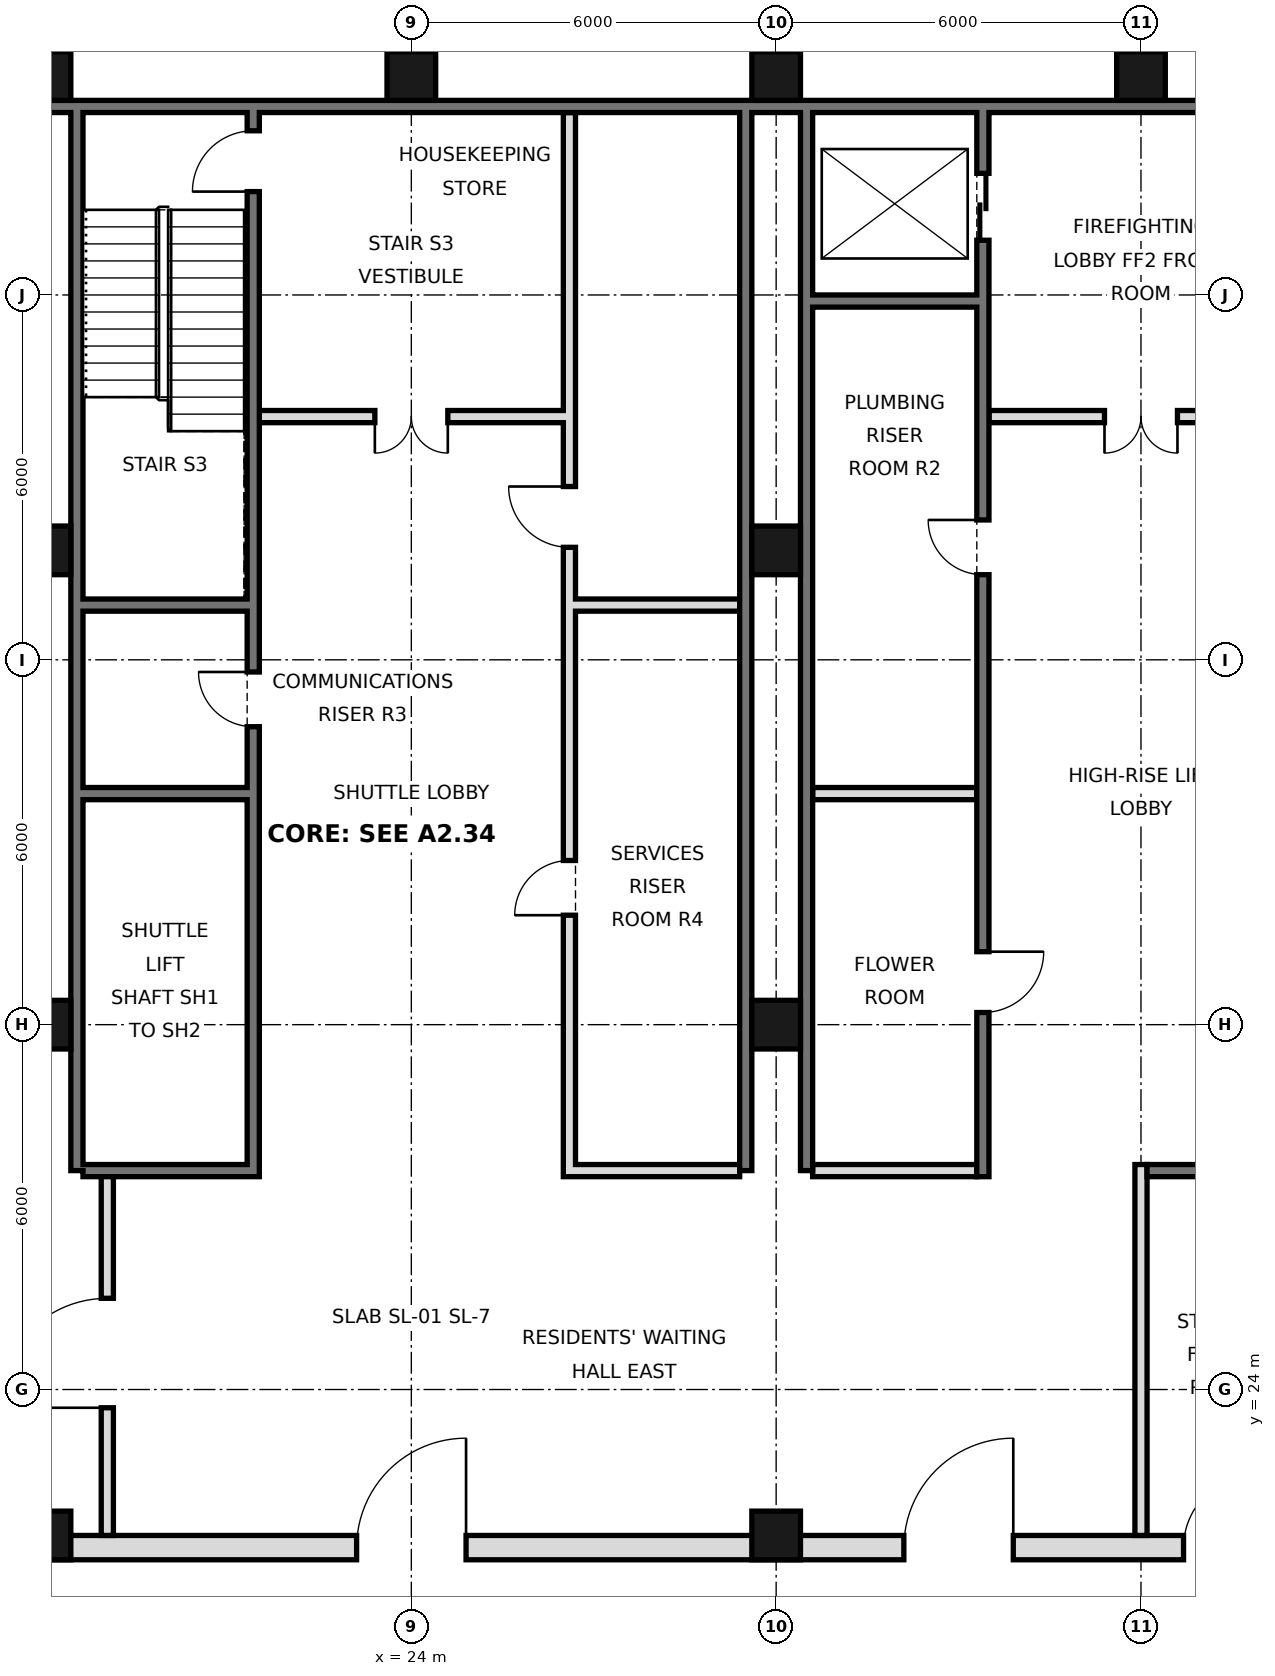
"""IFC4 building model, lengths in metres.
Left out: names, types, materials, properties, quantities, classifications, styles, units other than length and angle.
Written with IfcOpenShell. Run it as: python <this file> out.ifc"""

import sys

from ifc_helpers import new_model, si_unit, direction, frame, frame_2d, origin, origin_2d, place, context, subcontext, project, spatial, rectangle, hollow_rectangle, extrude, element, fill, save


model = new_model("IFC4")
c1 = context("Model", 3, precision=1e-05, world=origin(), true_north=direction((0.0, 1.0)))
c2 = subcontext(c1, "Body", "Model", "MODEL_VIEW")
j1 = project(units=[si_unit("LENGTHUNIT", "METRE"), si_unit("PLANEANGLEUNIT", "RADIAN")], contexts=[c1])
p1 = place(None, origin())
s1 = spatial("IfcSite", under=j1, at=p1, CompositionType="ELEMENT")
p2 = place(p1, origin())
s2 = spatial("IfcBuilding", under=s1, at=p2, CompositionType="ELEMENT")
p3 = place(p2, frame((0.0, 0.0, 134.0)))
s3 = spatial("IfcBuildingStorey", under=s2, at=p3, CompositionType="ELEMENT", Elevation=134.0)
for number, where, z_axis, x_axis in (
    (1, (18.0, 21.6, 0.0), (0.0, 0.0, 1.0), (1.0, 0.0, 0.0)),
    (2, (18.0, 30.0, 0.0), (0.0, 0.0, 1.0), (1.0, 0.0, 0.0)),
    (3, (18.0, 37.8, 0.0), (0.0, 0.0, 1.0), (1.0, 0.0, 0.0)),
    (4, (18.0, 45.6, 0.0), (0.0, 0.0, 1.0), (1.0, 0.0, 0.0)),
    (5, (24.0, 45.6, 0.0), (0.0, 0.0, 1.0), (1.0, 0.0, 0.0)),
    (6, (30.0, 21.6, 0.0), (0.0, 0.0, 1.0), (1.0, 0.0, 0.0)),
    (7, (30.0, 30.0, 0.0), (0.0, 0.0, 1.0), (1.0, 0.0, 0.0)),
    (8, (30.0, 37.8, 0.0), (0.0, 0.0, 1.0), (1.0, 0.0, 0.0)),
    (9, (30.0, 45.6, 0.0), (0.0, 0.0, 1.0), (1.0, 0.0, 0.0)),
    (10, (36.0, 45.6, 0.0), (0.0, 0.0, 1.0), (1.0, 0.0, 0.0)),
):
    element("IfcColumn", number, at=place(p3, frame(where, z_axis=z_axis, x_axis=x_axis)), inside=s3, PredefinedType="COLUMN", context=c2, shape_type="SweptSolid", body=[
        extrude(hollow_rectangle(XDim=0.8, YDim=0.8, WallThickness=0.05, at=origin_2d()), origin(), (0.0, 0.0, 1.0), 4.4),
    ])
p4 = place(p3, frame((6.6, 45.1, 0.0), z_axis=(0.0, 0.0, 1.0), x_axis=(1.0, 0.0, 0.0)))
e11 = element("IfcWall", 11, at=p4, inside=s3, PredefinedType="SOLIDWALL", context=c2, shape_type="SweptSolid", body=[
    extrude(rectangle(XDim=34.8, YDim=0.2, at=frame_2d((17.4, 0.0))), origin(), (0.0, 0.0, 1.0), 4.1),
])
for number, where, z_axis, x_axis in (
    (12, (18.5, 27.6, 0.0), (0.0, 0.0, 1.0), (0.0, 1.0, 0.0)),
    (13, (29.5, 27.6, 0.0), (0.0, 0.0, 1.0), (0.0, 1.0, 0.0)),
    (14, (30.5, 27.6, 0.0), (0.0, 0.0, 1.0), (0.0, 1.0, 0.0)),
):
    element("IfcWall", number, at=place(p3, frame(where, z_axis=z_axis, x_axis=x_axis)), inside=s3, PredefinedType="SOLIDWALL", context=c2, shape_type="SweptSolid", body=[
        extrude(rectangle(XDim=17.5, YDim=0.2, at=frame_2d((8.75, 0.0))), origin(), (0.0, 0.0, 1.0), 4.1),
    ])
p5 = place(p3, frame((5.6, 21.4, 0.0), z_axis=(0.0, 0.0, 1.0), x_axis=(1.0, 0.0, 0.0)))
e15 = element("IfcWall", 15, at=p5, inside=s3, PredefinedType="SOLIDWALL", context=c2, shape_type="SweptSolid", body=[
    extrude(rectangle(XDim=36.8, YDim=0.4, at=frame_2d((18.4, 0.0))), origin(), (0.0, 0.0, 1.0), 4.1),
])
p6 = place(p5, frame((8.5, 0.0, 0.0)))
e16 = element("IfcOpeningElement", 16, at=p6, cuts=e15, PredefinedType="OPENING", context=c2, shape_type="SweptSolid", body=[
    extrude(rectangle(XDim=1.8, YDim=2.1, at=frame_2d((0.9, 1.05))), frame((0.0, 0.21, 0.0), z_axis=(0.0, -1.0, 0.0), x_axis=(1.0, 0.0, 0.0)), (0.0, 0.0, 1.0), 0.42),
])
p7 = place(p5, frame((17.5, 0.0, 0.0)))
e17 = element("IfcOpeningElement", 17, at=p7, cuts=e15, PredefinedType="OPENING", context=c2, shape_type="SweptSolid", body=[
    extrude(rectangle(XDim=1.8, YDim=2.1, at=frame_2d((0.9, 1.05))), frame((0.0, 0.21, 0.0), z_axis=(0.0, -1.0, 0.0), x_axis=(1.0, 0.0, 0.0)), (0.0, 0.0, 1.0), 0.42),
])
p8 = place(p5, frame((26.5, 0.0, 0.0)))
e18 = element("IfcOpeningElement", 18, at=p8, cuts=e15, PredefinedType="OPENING", context=c2, shape_type="SweptSolid", body=[
    extrude(rectangle(XDim=1.8, YDim=2.1, at=frame_2d((0.9, 1.05))), frame((0.0, 0.21, 0.0), z_axis=(0.0, -1.0, 0.0), x_axis=(1.0, 0.0, 0.0)), (0.0, 0.0, 1.0), 0.42),
])
p9 = place(p5, frame((4.5, 0.0, 0.0)))
e19 = element("IfcOpeningElement", 19, at=p9, cuts=e15, PredefinedType="OPENING", context=c2, shape_type="SweptSolid", body=[
    extrude(rectangle(XDim=1.2, YDim=2.1, at=frame_2d((0.6, 1.05))), frame((0.0, 0.21, 0.0), z_axis=(0.0, -1.0, 0.0), x_axis=(1.0, 0.0, 0.0)), (0.0, 0.0, 1.0), 0.42),
])
p10 = place(p5, frame((31.1, 0.0, 0.0)))
e20 = element("IfcOpeningElement", 20, at=p10, cuts=e15, PredefinedType="OPENING", context=c2, shape_type="SweptSolid", body=[
    extrude(rectangle(XDim=1.2, YDim=2.1, at=frame_2d((0.6, 1.05))), frame((0.0, 0.21, 0.0), z_axis=(0.0, -1.0, 0.0), x_axis=(1.0, 0.0, 0.0)), (0.0, 0.0, 1.0), 0.42),
])
p11 = place(p3, frame((19.0, 21.6, 0.0), z_axis=(0.0, 0.0, 1.0), x_axis=(0.0, 1.0, 0.0)))
e21 = element("IfcWall", 21, at=p11, inside=s3, PredefinedType="PARTITIONING", context=c2, shape_type="SweptSolid", body=[
    extrude(rectangle(XDim=6.0, YDim=0.2, at=frame_2d((3.0, 0.0))), origin(), (0.0, 0.0, 1.0), 4.1),
])
p12 = place(p11, frame((2.1, 0.0, 0.0)))
e22 = element("IfcOpeningElement", 22, at=p12, cuts=e21, PredefinedType="OPENING", context=c2, shape_type="SweptSolid", body=[
    extrude(rectangle(XDim=1.8, YDim=2.1, at=frame_2d((0.9, 1.05))), frame((0.0, 0.11, 0.0), z_axis=(0.0, -1.0, 0.0), x_axis=(1.0, 0.0, 0.0)), (0.0, 0.0, 1.0), 0.22),
])
p13 = place(p3, frame((21.4, 27.5, 0.0), z_axis=(0.0, 0.0, 1.0), x_axis=(0.0, 1.0, 0.0)))
e23 = element("IfcWall", 23, at=p13, inside=s3, PredefinedType="SOLIDWALL", context=c2, shape_type="SweptSolid", body=[
    extrude(rectangle(XDim=17.5, YDim=0.2, at=frame_2d((8.75, 0.0))), origin(), (0.0, 0.0, 1.0), 4.1),
])
p14 = place(p13, frame((16.2, 0.0, 0.0)))
e24 = element("IfcOpeningElement", 24, at=p14, cuts=e23, PredefinedType="OPENING", context=c2, shape_type="SweptSolid", body=[
    extrude(rectangle(XDim=1.0, YDim=2.1, at=frame_2d((0.5, 1.05))), frame((0.0, 0.11, 0.0), z_axis=(0.0, -1.0, 0.0), x_axis=(1.0, 0.0, 0.0)), (0.0, 0.0, 1.0), 0.22),
])
p15 = place(p13, frame((7.4, 0.0, 0.0)))
e25 = element("IfcOpeningElement", 25, at=p15, cuts=e23, PredefinedType="OPENING", context=c2, shape_type="SweptSolid", body=[
    extrude(rectangle(XDim=0.9, YDim=2.1, at=frame_2d((0.45, 1.05))), frame((0.0, 0.11, 0.0), z_axis=(0.0, -1.0, 0.0), x_axis=(1.0, 0.0, 0.0)), (0.0, 0.0, 1.0), 0.22),
])
p16 = place(p3, frame((26.6, 27.5, 0.0), z_axis=(0.0, 0.0, 1.0), x_axis=(0.0, 1.0, 0.0)))
e26 = element("IfcWall", 26, at=p16, inside=s3, PredefinedType="SOLIDWALL", context=c2, shape_type="SweptSolid", body=[
    extrude(rectangle(XDim=17.5, YDim=0.2, at=frame_2d((8.75, 0.0))), origin(), (0.0, 0.0, 1.0), 4.1),
])
p17 = place(p16, frame((4.3, 0.0, 0.0)))
e27 = element("IfcOpeningElement", 27, at=p17, cuts=e26, PredefinedType="OPENING", context=c2, shape_type="SweptSolid", body=[
    extrude(rectangle(XDim=0.9, YDim=2.1, at=frame_2d((0.45, 1.05))), frame((0.0, 0.11, 0.0), z_axis=(0.0, -1.0, 0.0), x_axis=(1.0, 0.0, 0.0)), (0.0, 0.0, 1.0), 0.22),
])
p18 = place(p16, frame((10.35, 0.0, 0.0)))
e28 = element("IfcOpeningElement", 28, at=p18, cuts=e26, PredefinedType="OPENING", context=c2, shape_type="SweptSolid", body=[
    extrude(rectangle(XDim=1.0, YDim=2.1, at=frame_2d((0.5, 1.05))), frame((0.0, 0.11, 0.0), z_axis=(0.0, -1.0, 0.0), x_axis=(1.0, 0.0, 0.0)), (0.0, 0.0, 1.0), 0.22),
])
p19 = place(p3, frame((33.4, 27.5, 0.0), z_axis=(0.0, 0.0, 1.0), x_axis=(0.0, 1.0, 0.0)))
e29 = element("IfcWall", 29, at=p19, inside=s3, PredefinedType="SOLIDWALL", context=c2, shape_type="SweptSolid", body=[
    extrude(rectangle(XDim=17.5, YDim=0.2, at=frame_2d((8.75, 0.0))), origin(), (0.0, 0.0, 1.0), 4.1),
])
p20 = place(p19, frame((15.4, 0.0, 0.0)))
e30 = element("IfcOpeningElement", 30, at=p20, cuts=e29, PredefinedType="OPENING", context=c2, shape_type="SweptSolid", body=[
    extrude(rectangle(XDim=1.1, YDim=2.1, at=frame_2d((0.55, 1.05))), frame((0.0, 0.11, 0.0), z_axis=(0.0, -1.0, 0.0), x_axis=(1.0, 0.0, 0.0)), (0.0, 0.0, 1.0), 0.22),
])
p21 = place(p19, frame((2.7, 0.0, 0.0)))
e31 = element("IfcOpeningElement", 31, at=p21, cuts=e29, PredefinedType="OPENING", context=c2, shape_type="SweptSolid", body=[
    extrude(rectangle(XDim=1.0, YDim=2.1, at=frame_2d((0.5, 1.05))), frame((0.0, 0.11, 0.0), z_axis=(0.0, -1.0, 0.0), x_axis=(1.0, 0.0, 0.0)), (0.0, 0.0, 1.0), 0.22),
])
p22 = place(p19, frame((9.9, 0.0, 0.0)))
e32 = element("IfcOpeningElement", 32, at=p22, cuts=e29, PredefinedType="OPENING", context=c2, shape_type="SweptSolid", body=[
    extrude(rectangle(XDim=0.9, YDim=2.1, at=frame_2d((0.45, 1.05))), frame((0.0, 0.11, 0.0), z_axis=(0.0, -1.0, 0.0), x_axis=(1.0, 0.0, 0.0)), (0.0, 0.0, 1.0), 0.22),
])
p23 = place(p3, frame((36.0, 21.6, 0.0), z_axis=(0.0, 0.0, 1.0), x_axis=(0.0, 1.0, 0.0)))
e33 = element("IfcWall", 33, at=p23, inside=s3, PredefinedType="PARTITIONING", context=c2, shape_type="SweptSolid", body=[
    extrude(rectangle(XDim=6.1, YDim=0.2, at=frame_2d((3.05, 0.0))), origin(), (0.0, 0.0, 1.0), 4.1),
])
for number, where, z_axis, x_axis in (
    (34, (18.6, 27.6, 0.0), (0.0, 0.0, 1.0), (1.0, 0.0, 0.0)),
    (35, (26.7, 27.6, 0.0), (0.0, 0.0, 1.0), (1.0, 0.0, 0.0)),
):
    element("IfcWall", number, at=place(p3, frame(where, z_axis=z_axis, x_axis=x_axis)), inside=s3, PredefinedType="SOLIDWALL", context=c2, shape_type="SweptSolid", body=[
        extrude(rectangle(XDim=2.7, YDim=0.2, at=frame_2d((1.35, 0.0))), origin(), (0.0, 0.0, 1.0), 4.1),
    ])
p24 = place(p3, frame((30.6, 27.6, 0.0), z_axis=(0.0, 0.0, 1.0), x_axis=(1.0, 0.0, 0.0)))
e36 = element("IfcWall", 36, at=p24, inside=s3, PredefinedType="PARTITIONING", context=c2, shape_type="SweptSolid", body=[
    extrude(rectangle(XDim=2.7, YDim=0.2, at=frame_2d((1.35, 0.0))), origin(), (0.0, 0.0, 1.0), 4.1),
])
p25 = place(p3, frame((36.1, 27.6, 0.0), z_axis=(0.0, 0.0, 1.0), x_axis=(1.0, 0.0, 0.0)))
e37 = element("IfcWall", 37, at=p25, inside=s3, PredefinedType="SOLIDWALL", context=c2, shape_type="SweptSolid", body=[
    extrude(rectangle(XDim=5.3, YDim=0.2, at=frame_2d((2.65, 0.0))), origin(), (0.0, 0.0, 1.0), 4.1),
])
for number, where, z_axis, x_axis in (
    (38, (18.6, 33.8, 0.0), (0.0, 0.0, 1.0), (1.0, 0.0, 0.0)),
    (39, (30.6, 33.8, 0.0), (0.0, 0.0, 1.0), (1.0, 0.0, 0.0)),
    (40, (18.6, 36.9, 0.0), (0.0, 0.0, 1.0), (1.0, 0.0, 0.0)),
    (41, (26.7, 36.9, 0.0), (0.0, 0.0, 1.0), (1.0, 0.0, 0.0)),
):
    element("IfcWall", number, at=place(p3, frame(where, z_axis=z_axis, x_axis=x_axis)), inside=s3, PredefinedType="SOLIDWALL", context=c2, shape_type="SweptSolid", body=[
        extrude(rectangle(XDim=2.7, YDim=0.2, at=frame_2d((1.35, 0.0))), origin(), (0.0, 0.0, 1.0), 4.1),
    ])
p26 = place(p3, frame((21.5, 40.0, 0.0), z_axis=(0.0, 0.0, 1.0), x_axis=(1.0, 0.0, 0.0)))
e42 = element("IfcWall", 42, at=p26, inside=s3, PredefinedType="PARTITIONING", context=c2, shape_type="SweptSolid", body=[
    extrude(rectangle(XDim=5.0, YDim=0.2, at=frame_2d((2.5, 0.0))), origin(), (0.0, 0.0, 1.0), 4.1),
])
p27 = place(p26, frame((1.9, 0.0, 0.0)))
e43 = element("IfcOpeningElement", 43, at=p27, cuts=e42, PredefinedType="OPENING", context=c2, shape_type="SweptSolid", body=[
    extrude(rectangle(XDim=1.2, YDim=2.1, at=frame_2d((0.6, 1.05))), frame((0.0, 0.11, 0.0), z_axis=(0.0, -1.0, 0.0), x_axis=(1.0, 0.0, 0.0)), (0.0, 0.0, 1.0), 0.22),
])
p28 = place(p3, frame((33.5, 40.0, 0.0), z_axis=(0.0, 0.0, 1.0), x_axis=(1.0, 0.0, 0.0)))
e44 = element("IfcWall", 44, at=p28, inside=s3, PredefinedType="PARTITIONING", context=c2, shape_type="SweptSolid", body=[
    extrude(rectangle(XDim=5.0, YDim=0.2, at=frame_2d((2.5, 0.0))), origin(), (0.0, 0.0, 1.0), 4.1),
])
p29 = place(p28, frame((1.9, 0.0, 0.0)))
e45 = element("IfcOpeningElement", 45, at=p29, cuts=e44, PredefinedType="OPENING", context=c2, shape_type="SweptSolid", body=[
    extrude(rectangle(XDim=1.2, YDim=2.1, at=frame_2d((0.6, 1.05))), frame((0.0, 0.11, 0.0), z_axis=(0.0, -1.0, 0.0), x_axis=(1.0, 0.0, 0.0)), (0.0, 0.0, 1.0), 0.22),
])
p30 = place(p3, frame((30.6, 41.9, 0.0), z_axis=(0.0, 0.0, 1.0), x_axis=(1.0, 0.0, 0.0)))
e46 = element("IfcWall", 46, at=p30, inside=s3, PredefinedType="SOLIDWALL", context=c2, shape_type="SweptSolid", body=[
    extrude(rectangle(XDim=2.7, YDim=0.2, at=frame_2d((1.35, 0.0))), origin(), (0.0, 0.0, 1.0), 4.1),
])
p31 = place(p12, origin())
e47 = element("IfcDoor", 47, at=p31, inside=s3, OperationType="SINGLE_SWING_LEFT", PredefinedType="DOOR", context=c2, shape_type="SweptSolid", body=[
    extrude(rectangle(XDim=1.8, YDim=2.1, at=frame_2d((0.9, 1.05))), frame((0.0, 0.025, 0.0), z_axis=(0.0, -1.0, 0.0), x_axis=(1.0, 0.0, 0.0)), (0.0, 0.0, 1.0), 0.05),
])
fill(e22, e47)
p32 = place(p7, frame((1.8, 0.0, 0.0), z_axis=(0.0, 0.0, 1.0), x_axis=(-1.0, 0.0, 0.0)))
e48 = element("IfcDoor", 48, at=p32, inside=s3, OperationType="SINGLE_SWING_LEFT", PredefinedType="DOOR", context=c2, shape_type="SweptSolid", body=[
    extrude(rectangle(XDim=1.8, YDim=2.1, at=frame_2d((0.9, 1.05))), frame((0.0, 0.025, 0.0), z_axis=(0.0, -1.0, 0.0), x_axis=(1.0, 0.0, 0.0)), (0.0, 0.0, 1.0), 0.05),
])
fill(e17, e48)
p33 = place(p8, frame((1.8, 0.0, 0.0), z_axis=(0.0, 0.0, 1.0), x_axis=(-1.0, 0.0, 0.0)))
e49 = element("IfcDoor", 49, at=p33, inside=s3, OperationType="SINGLE_SWING_LEFT", PredefinedType="DOOR", context=c2, shape_type="SweptSolid", body=[
    extrude(rectangle(XDim=1.8, YDim=2.1, at=frame_2d((0.9, 1.05))), frame((0.0, 0.025, 0.0), z_axis=(0.0, -1.0, 0.0), x_axis=(1.0, 0.0, 0.0)), (0.0, 0.0, 1.0), 0.05),
])
fill(e18, e49)
p34 = place(p10, frame((1.2, 0.0, 0.0), z_axis=(0.0, 0.0, 1.0), x_axis=(-1.0, 0.0, 0.0)))
e50 = element("IfcDoor", 50, at=p34, inside=s3, OperationType="SINGLE_SWING_LEFT", PredefinedType="DOOR", context=c2, shape_type="SweptSolid", body=[
    extrude(rectangle(XDim=1.2, YDim=2.1, at=frame_2d((0.6, 1.05))), frame((0.0, 0.025, 0.0), z_axis=(0.0, -1.0, 0.0), x_axis=(1.0, 0.0, 0.0)), (0.0, 0.0, 1.0), 0.05),
])
fill(e20, e50)
p35 = place(p27, frame((1.2, 0.0, 0.0), z_axis=(0.0, 0.0, 1.0), x_axis=(-1.0, 0.0, 0.0)))
e51 = element("IfcDoor", 51, at=p35, inside=s3, OperationType="DOUBLE_DOOR_SINGLE_SWING", PredefinedType="DOOR", context=c2, shape_type="SweptSolid", body=[
    extrude(rectangle(XDim=1.2, YDim=2.1, at=frame_2d((0.6, 1.05))), frame((0.0, 0.025, 0.0), z_axis=(0.0, -1.0, 0.0), x_axis=(1.0, 0.0, 0.0)), (0.0, 0.0, 1.0), 0.05),
])
fill(e43, e51)
p36 = place(p29, frame((1.2, 0.0, 0.0), z_axis=(0.0, 0.0, 1.0), x_axis=(-1.0, 0.0, 0.0)))
e52 = element("IfcDoor", 52, at=p36, inside=s3, OperationType="DOUBLE_DOOR_SINGLE_SWING", PredefinedType="DOOR", context=c2, shape_type="SweptSolid", body=[
    extrude(rectangle(XDim=1.2, YDim=2.1, at=frame_2d((0.6, 1.05))), frame((0.0, 0.025, 0.0), z_axis=(0.0, -1.0, 0.0), x_axis=(1.0, 0.0, 0.0)), (0.0, 0.0, 1.0), 0.05),
])
fill(e45, e52)
p37 = place(p20, origin())
e53 = element("IfcDoor", 53, at=p37, inside=s3, OperationType="DOUBLE_DOOR_SLIDING", PredefinedType="DOOR", context=c2, shape_type="SweptSolid", body=[
    extrude(rectangle(XDim=1.1, YDim=2.1, at=frame_2d((0.55, 1.05))), frame((0.0, 0.025, 0.0), z_axis=(0.0, -1.0, 0.0), x_axis=(1.0, 0.0, 0.0)), (0.0, 0.0, 1.0), 0.05),
])
fill(e30, e53)
p38 = place(p21, origin())
e54 = element("IfcDoor", 54, at=p38, inside=s3, OperationType="SINGLE_SWING_RIGHT", PredefinedType="DOOR", context=c2, shape_type="SweptSolid", body=[
    extrude(rectangle(XDim=1.0, YDim=2.1, at=frame_2d((0.5, 1.05))), frame((0.0, 0.025, 0.0), z_axis=(0.0, -1.0, 0.0), x_axis=(1.0, 0.0, 0.0)), (0.0, 0.0, 1.0), 0.05),
])
fill(e31, e54)
p39 = place(p14, origin())
e55 = element("IfcDoor", 55, at=p39, inside=s3, OperationType="SINGLE_SWING_LEFT", PredefinedType="DOOR", context=c2, shape_type="SweptSolid", body=[
    extrude(rectangle(XDim=1.0, YDim=2.1, at=frame_2d((0.5, 1.05))), frame((0.0, 0.025, 0.0), z_axis=(0.0, -1.0, 0.0), x_axis=(1.0, 0.0, 0.0)), (0.0, 0.0, 1.0), 0.05),
])
fill(e24, e55)
p40 = place(p22, frame((0.9, 0.0, 0.0), z_axis=(0.0, 0.0, 1.0), x_axis=(-1.0, 0.0, 0.0)))
e56 = element("IfcDoor", 56, at=p40, inside=s3, OperationType="SINGLE_SWING_LEFT", PredefinedType="DOOR", context=c2, shape_type="SweptSolid", body=[
    extrude(rectangle(XDim=0.9, YDim=2.1, at=frame_2d((0.45, 1.05))), frame((0.0, 0.025, 0.0), z_axis=(0.0, -1.0, 0.0), x_axis=(1.0, 0.0, 0.0)), (0.0, 0.0, 1.0), 0.05),
])
fill(e32, e56)
p41 = place(p15, frame((0.9, 0.0, 0.0), z_axis=(0.0, 0.0, 1.0), x_axis=(-1.0, 0.0, 0.0)))
e57 = element("IfcDoor", 57, at=p41, inside=s3, OperationType="SINGLE_SWING_LEFT", PredefinedType="DOOR", context=c2, shape_type="SweptSolid", body=[
    extrude(rectangle(XDim=0.9, YDim=2.1, at=frame_2d((0.45, 1.05))), frame((0.0, 0.025, 0.0), z_axis=(0.0, -1.0, 0.0), x_axis=(1.0, 0.0, 0.0)), (0.0, 0.0, 1.0), 0.05),
])
fill(e25, e57)
p42 = place(p17, origin())
e58 = element("IfcDoor", 58, at=p42, inside=s3, OperationType="SINGLE_SWING_LEFT", PredefinedType="DOOR", context=c2, shape_type="SweptSolid", body=[
    extrude(rectangle(XDim=0.9, YDim=2.1, at=frame_2d((0.45, 1.05))), frame((0.0, 0.025, 0.0), z_axis=(0.0, -1.0, 0.0), x_axis=(1.0, 0.0, 0.0)), (0.0, 0.0, 1.0), 0.05),
])
fill(e27, e58)
p43 = place(p18, frame((1.0, 0.0, 0.0), z_axis=(0.0, 0.0, 1.0), x_axis=(-1.0, 0.0, 0.0)))
e59 = element("IfcDoor", 59, at=p43, inside=s3, OperationType="SINGLE_SWING_LEFT", PredefinedType="DOOR", context=c2, shape_type="SweptSolid", body=[
    extrude(rectangle(XDim=1.0, YDim=2.1, at=frame_2d((0.5, 1.05))), frame((0.0, 0.025, 0.0), z_axis=(0.0, -1.0, 0.0), x_axis=(1.0, 0.0, 0.0)), (0.0, 0.0, 1.0), 0.05),
])
fill(e28, e59)
save(model, sys.argv[1])
